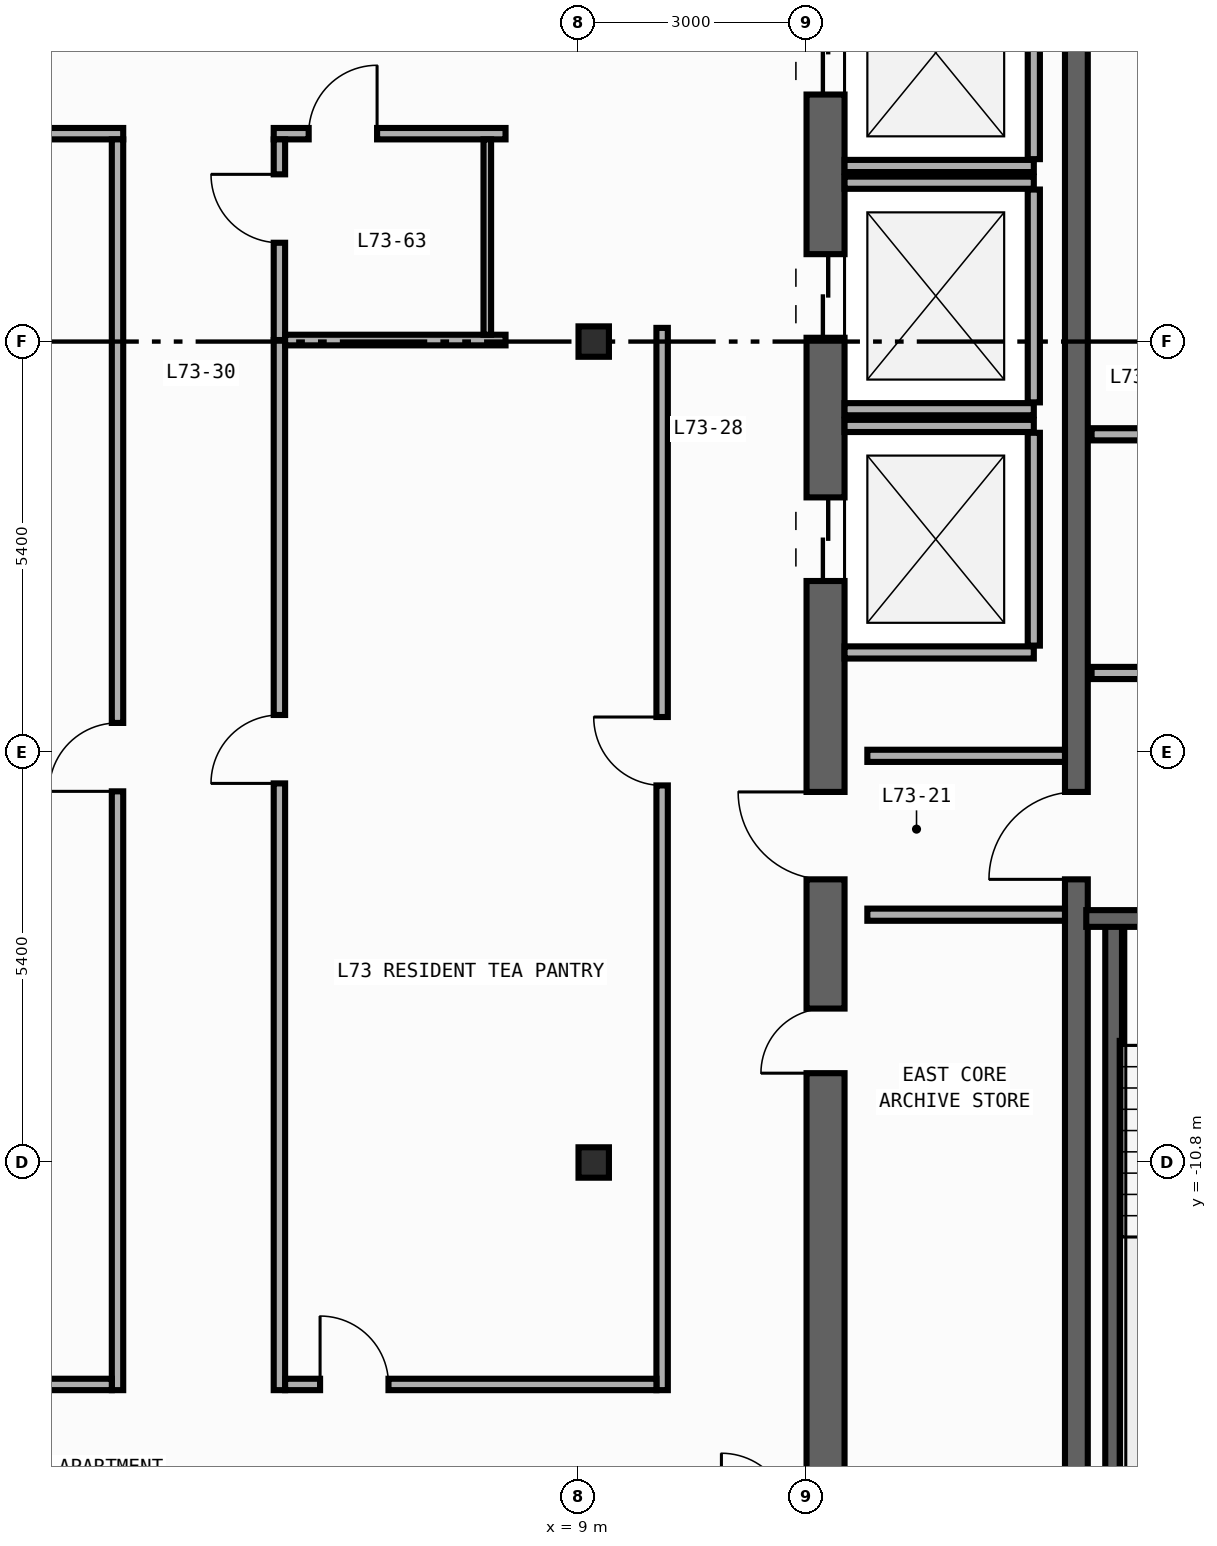
"""IFC4 building model, lengths in metres.
Left out: names, types, materials, properties, quantities, classifications, styles, units other than length and angle.
Written with IfcOpenShell. Run it as: python <this file> out.ifc"""

import sys

from ifc_helpers import new_model, si_unit, direction, frame, frame_2d, origin, origin_2d, place, context, subcontext, project, spatial, rectangle, i_section, extrude, element, fill, save


model = new_model("IFC4")
c1 = context("Model", 3, precision=1e-05, world=origin(), true_north=direction((0.0, 1.0)))
c2 = subcontext(c1, "Body", "Model", "MODEL_VIEW")
j1 = project(units=[si_unit("LENGTHUNIT", "METRE"), si_unit("PLANEANGLEUNIT", "RADIAN")], contexts=[c1])
p1 = place(None, origin())
s1 = spatial("IfcSite", under=j1, at=p1, CompositionType="ELEMENT")
p2 = place(p1, origin())
s2 = spatial("IfcBuilding", under=s1, at=p2, CompositionType="ELEMENT")
p3 = place(p2, frame((0.0, 0.0, 304.2)))
s3 = spatial("IfcBuildingStorey", under=s2, at=p3, CompositionType="ELEMENT", Elevation=304.2)
p4 = place(p3, frame((12.25, -19.8, 0.0), z_axis=(0.0, 0.0, 1.0), x_axis=(0.0, 1.0, 0.0)))
e1 = element("IfcWall", 1, at=p4, inside=s3, PredefinedType="SHEAR", context=c2, shape_type="SweptSolid", body=[
    extrude(rectangle(XDim=27.0, YDim=0.5, at=frame_2d((13.5, 0.0))), origin(), (0.0, 0.0, 1.0), 3.54),
])
p5 = place(p4, frame((23.05, 0.0, 0.0)))
e2 = element("IfcOpeningElement", 2, at=p5, cuts=e1, PredefinedType="OPENING", context=c2, shape_type="SweptSolid", body=[
    extrude(rectangle(XDim=1.1, YDim=2.2, at=frame_2d((0.55, 1.1))), frame((0.0, 0.26, 0.0), z_axis=(0.0, -1.0, 0.0), x_axis=(1.0, 0.0, 0.0)), (0.0, 0.0, 1.0), 0.52),
])
p6 = place(p4, frame((19.85, 0.0, 0.0)))
e3 = element("IfcOpeningElement", 3, at=p6, cuts=e1, PredefinedType="OPENING", context=c2, shape_type="SweptSolid", body=[
    extrude(rectangle(XDim=1.1, YDim=2.2, at=frame_2d((0.55, 1.1))), frame((0.0, 0.26, 0.0), z_axis=(0.0, -1.0, 0.0), x_axis=(1.0, 0.0, 0.0)), (0.0, 0.0, 1.0), 0.52),
])
p7 = place(p4, frame((16.65, 0.0, 0.0)))
e4 = element("IfcOpeningElement", 4, at=p7, cuts=e1, PredefinedType="OPENING", context=c2, shape_type="SweptSolid", body=[
    extrude(rectangle(XDim=1.1, YDim=2.2, at=frame_2d((0.55, 1.1))), frame((0.0, 0.26, 0.0), z_axis=(0.0, -1.0, 0.0), x_axis=(1.0, 0.0, 0.0)), (0.0, 0.0, 1.0), 0.52),
])
p8 = place(p4, frame((10.175, 0.0, 0.0)))
e5 = element("IfcOpeningElement", 5, at=p8, cuts=e1, PredefinedType="OPENING", context=c2, shape_type="SweptSolid", body=[
    extrude(rectangle(XDim=0.85, YDim=2.1, at=frame_2d((0.425, 1.05))), frame((0.0, 0.26, 0.0), z_axis=(0.0, -1.0, 0.0), x_axis=(1.0, 0.0, 0.0)), (0.0, 0.0, 1.0), 0.52),
])
p9 = place(p4, frame((12.725, 0.0, 0.0)))
e6 = element("IfcOpeningElement", 6, at=p9, cuts=e1, PredefinedType="OPENING", context=c2, shape_type="SweptSolid", body=[
    extrude(rectangle(XDim=1.15, YDim=2.2, at=frame_2d((0.575, 1.1))), frame((0.0, 0.26, 0.0), z_axis=(0.0, -1.0, 0.0), x_axis=(1.0, 0.0, 0.0)), (0.0, 0.0, 1.0), 0.52),
])
p10 = place(p4, frame((25.125, 0.0, 0.0)))
e7 = element("IfcOpeningElement", 7, at=p10, cuts=e1, PredefinedType="OPENING", context=c2, shape_type="SweptSolid", body=[
    extrude(rectangle(XDim=0.85, YDim=2.1, at=frame_2d((0.425, 1.05))), frame((0.0, 0.26, 0.0), z_axis=(0.0, -1.0, 0.0), x_axis=(1.0, 0.0, 0.0)), (0.0, 0.0, 1.0), 0.52),
])
p11 = place(p3, frame((15.55, -19.3, 0.0), z_axis=(0.0, 0.0, 1.0), x_axis=(0.0, 1.0, 0.0)))
e8 = element("IfcWall", 8, at=p11, inside=s3, PredefinedType="SHEAR", context=c2, shape_type="SweptSolid", body=[
    extrude(rectangle(XDim=26.0, YDim=0.3, at=frame_2d((13.0, 0.0))), origin(), (0.0, 0.0, 1.0), 3.54),
])
p12 = place(p11, frame((12.225, 0.0, 0.0)))
e9 = element("IfcOpeningElement", 9, at=p12, cuts=e8, PredefinedType="OPENING", context=c2, shape_type="SweptSolid", body=[
    extrude(rectangle(XDim=1.15, YDim=2.2, at=frame_2d((0.575, 1.1))), frame((0.0, 0.16, 0.0), z_axis=(0.0, -1.0, 0.0), x_axis=(1.0, 0.0, 0.0)), (0.0, 0.0, 1.0), 0.32),
])
p13 = place(p11, frame((24.625, 0.0, 0.0)))
e10 = element("IfcOpeningElement", 10, at=p13, cuts=e8, PredefinedType="OPENING", context=c2, shape_type="SweptSolid", body=[
    extrude(rectangle(XDim=0.85, YDim=2.1, at=frame_2d((0.425, 1.05))), frame((0.0, 0.16, 0.0), z_axis=(0.0, -1.0, 0.0), x_axis=(1.0, 0.0, 0.0)), (0.0, 0.0, 1.0), 0.32),
])
p14 = place(p3, frame((16.04, -19.01, 0.0), z_axis=(0.0, 0.0, 1.0), x_axis=(0.0, 1.0, 0.0)))
e11 = element("IfcWall", 11, at=p14, inside=s3, PredefinedType="SHEAR", context=c2, shape_type="SweptSolid", body=[
    extrude(rectangle(XDim=11.42, YDim=0.22, at=frame_2d((5.71, 0.0))), origin(), (0.0, 0.0, 1.0), 3.54),
])
p15 = place(p3, frame((19.92, -7.59, 0.0), z_axis=(0.0, 0.0, 1.0), x_axis=(-1.0, 0.0, 0.0)))
e12 = element("IfcWall", 12, at=p15, inside=s3, PredefinedType="SHEAR", context=c2, shape_type="SweptSolid", body=[
    extrude(rectangle(XDim=4.24, YDim=0.22, at=frame_2d((2.12, 0.0))), origin(), (0.0, 0.0, 1.0), 3.54),
])
p16 = place(p15, frame((1.08, 0.0, 0.0)))
e13 = element("IfcOpeningElement", 13, at=p16, cuts=e12, PredefinedType="OPENING", context=c2, shape_type="SweptSolid", body=[
    extrude(rectangle(XDim=1.1, YDim=2.2, at=frame_2d((0.55, 1.1))), frame((0.0, 0.12, 0.0), z_axis=(0.0, -1.0, 0.0), x_axis=(1.0, 0.0, 0.0)), (0.0, 0.0, 1.0), 0.24),
])
for number, where, z_axis, x_axis in (
    (14, (9.2, -10.8, 0.0), (0.0, 0.0, 1.0), (1.0, 0.0, 0.0)),
    (15, (9.2, 0.0, 0.0), (0.0, 0.0, 1.0), (1.0, 0.0, 0.0)),
):
    element("IfcColumn", number, at=place(p3, frame(where, z_axis=z_axis, x_axis=x_axis)), inside=s3, PredefinedType="COLUMN", context=c2, shape_type="SweptSolid", body=[
        extrude(i_section(OverallWidth=0.4, OverallDepth=0.4, WebThickness=0.013, FlangeThickness=0.021, FilletRadius=0.022, at=origin_2d()), origin(), (0.0, 0.0, 1.0), 3.8),
    ])
p17 = place(p3, frame((12.5, 2.31, 0.0), z_axis=(0.0, 0.0, 1.0), x_axis=(1.0, 0.0, 0.0)))
e16 = element("IfcWall", 16, at=p17, inside=s3, PredefinedType="STANDARD", context=c2, shape_type="SweptSolid", body=[
    extrude(rectangle(XDim=2.49, YDim=0.16, at=frame_2d((1.245, 0.0))), origin(), (0.0, 0.0, 1.0), 3.54),
])
p18 = place(p3, frame((14.99, 2.4, 0.0), z_axis=(0.0, 0.0, 1.0), x_axis=(0.0, 1.0, 0.0)))
e17 = element("IfcWall", 17, at=p18, inside=s3, PredefinedType="STANDARD", context=c2, shape_type="SweptSolid", body=[
    extrude(rectangle(XDim=2.8, YDim=0.16, at=frame_2d((1.4, 0.0))), origin(), (0.0, 0.0, 1.0), 3.54),
])
for number, where, z_axis, x_axis in (
    (18, (12.5, -0.89, 0.0), (0.0, 0.0, 1.0), (1.0, 0.0, 0.0)),
    (19, (12.5, 2.09, 0.0), (0.0, 0.0, 1.0), (1.0, 0.0, 0.0)),
):
    element("IfcWall", number, at=place(p3, frame(where, z_axis=z_axis, x_axis=x_axis)), inside=s3, PredefinedType="STANDARD", context=c2, shape_type="SweptSolid", body=[
        extrude(rectangle(XDim=2.49, YDim=0.16, at=frame_2d((1.245, 0.0))), origin(), (0.0, 0.0, 1.0), 3.54),
    ])
p19 = place(p3, frame((14.99, -0.8, 0.0), z_axis=(0.0, 0.0, 1.0), x_axis=(0.0, 1.0, 0.0)))
e20 = element("IfcWall", 20, at=p19, inside=s3, PredefinedType="STANDARD", context=c2, shape_type="SweptSolid", body=[
    extrude(rectangle(XDim=2.8, YDim=0.16, at=frame_2d((1.4, 0.0))), origin(), (0.0, 0.0, 1.0), 3.54),
])
for number, where, z_axis, x_axis in (
    (21, (12.5, -4.09, 0.0), (0.0, 0.0, 1.0), (1.0, 0.0, 0.0)),
    (22, (12.5, -1.11, 0.0), (0.0, 0.0, 1.0), (1.0, 0.0, 0.0)),
):
    element("IfcWall", number, at=place(p3, frame(where, z_axis=z_axis, x_axis=x_axis)), inside=s3, PredefinedType="STANDARD", context=c2, shape_type="SweptSolid", body=[
        extrude(rectangle(XDim=2.49, YDim=0.16, at=frame_2d((1.245, 0.0))), origin(), (0.0, 0.0, 1.0), 3.54),
    ])
p20 = place(p3, frame((14.99, -4.0, 0.0), z_axis=(0.0, 0.0, 1.0), x_axis=(0.0, 1.0, 0.0)))
e23 = element("IfcWall", 23, at=p20, inside=s3, PredefinedType="STANDARD", context=c2, shape_type="SweptSolid", body=[
    extrude(rectangle(XDim=2.8, YDim=0.16, at=frame_2d((1.4, 0.0))), origin(), (0.0, 0.0, 1.0), 3.54),
])
p21 = place(p3, frame((15.75, -4.36, 0.0), z_axis=(0.0, 0.0, 1.0), x_axis=(1.0, 0.0, 0.0)))
e24 = element("IfcWall", 24, at=p21, inside=s3, PredefinedType="STANDARD", context=c2, shape_type="SweptSolid", body=[
    extrude(rectangle(XDim=3.8, YDim=0.16, at=frame_2d((1.9, 0.0))), origin(), (0.0, 0.0, 1.0), 3.54),
])
p22 = place(p21, frame((1.47, 0.0, 0.0)))
e25 = element("IfcOpeningElement", 25, at=p22, cuts=e24, PredefinedType="OPENING", context=c2, shape_type="SweptSolid", body=[
    extrude(rectangle(XDim=1.15, YDim=2.2, at=frame_2d((0.575, 1.1))), frame((0.0, 0.09, 0.0), z_axis=(0.0, -1.0, 0.0), x_axis=(1.0, 0.0, 0.0)), (0.0, 0.0, 1.0), 0.18),
])
p23 = place(p3, frame((15.75, -1.22, 0.0), z_axis=(0.0, 0.0, 1.0), x_axis=(1.0, 0.0, 0.0)))
e26 = element("IfcWall", 26, at=p23, inside=s3, PredefinedType="STANDARD", context=c2, shape_type="SweptSolid", body=[
    extrude(rectangle(XDim=3.8, YDim=0.16, at=frame_2d((1.9, 0.0))), origin(), (0.0, 0.0, 1.0), 3.54),
])
for number, where, z_axis, x_axis in (
    (27, (12.8, -5.45, 0.0), (0.0, 0.0, 1.0), (1.0, 0.0, 0.0)),
    (28, (12.8, -7.54, 0.0), (0.0, 0.0, 1.0), (1.0, 0.0, 0.0)),
):
    element("IfcWall", number, at=place(p3, frame(where, z_axis=z_axis, x_axis=x_axis)), inside=s3, PredefinedType="STANDARD", context=c2, shape_type="SweptSolid", body=[
        extrude(rectangle(XDim=2.6, YDim=0.16, at=frame_2d((1.3, 0.0))), origin(), (0.0, 0.0, 1.0), 3.54),
    ])
p24 = place(p3, frame((10.1, -13.795, 0.0), z_axis=(0.0, 0.0, 1.0), x_axis=(0.0, 1.0, 0.0)))
e29 = element("IfcWall", 29, at=p24, inside=s3, PredefinedType="PARTITIONING", context=c2, shape_type="SweptSolid", body=[
    extrude(rectangle(XDim=13.975, YDim=0.15, at=frame_2d((6.987, 0.0))), origin(), (0.0, 0.0, 1.0), 3.54),
])
p25 = place(p24, frame((7.956, 0.0, 0.0)))
e30 = element("IfcOpeningElement", 30, at=p25, cuts=e29, PredefinedType="OPENING", context=c2, shape_type="SweptSolid", body=[
    extrude(rectangle(XDim=0.9, YDim=2.15, at=frame_2d((0.45, 1.075))), frame((0.0, 0.085, 0.0), z_axis=(0.0, -1.0, 0.0), x_axis=(1.0, 0.0, 0.0)), (0.0, 0.0, 1.0), 0.17),
])
p26 = place(p3, frame((-10.025, 2.735, 0.0), z_axis=(0.0, 0.0, 1.0), x_axis=(1.0, 0.0, 0.0)))
e31 = element("IfcWall", 31, at=p26, inside=s3, PredefinedType="PARTITIONING", context=c2, shape_type="SweptSolid", body=[
    extrude(rectangle(XDim=13.035, YDim=0.15, at=frame_2d((6.518, 0.0))), origin(), (0.0, 0.0, 1.0), 3.54),
])
p27 = place(p26, frame((9.672, 0.0, 0.0)))
e32 = element("IfcOpeningElement", 32, at=p27, cuts=e31, PredefinedType="OPENING", context=c2, shape_type="SweptSolid", body=[
    extrude(rectangle(XDim=0.9, YDim=2.15, at=frame_2d((0.45, 1.075))), frame((0.0, 0.085, 0.0), z_axis=(0.0, -1.0, 0.0), x_axis=(1.0, 0.0, 0.0)), (0.0, 0.0, 1.0), 0.17),
])
p28 = place(p3, frame((4.99, 2.735, 0.0), z_axis=(0.0, 0.0, 1.0), x_axis=(1.0, 0.0, 0.0)))
e33 = element("IfcWall", 33, at=p28, inside=s3, PredefinedType="PARTITIONING", context=c2, shape_type="SweptSolid", body=[
    extrude(rectangle(XDim=3.05, YDim=0.15, at=frame_2d((1.525, 0.0))), origin(), (0.0, 0.0, 1.0), 3.54),
])
p29 = place(p28, frame((0.46, 0.0, 0.0)))
e34 = element("IfcOpeningElement", 34, at=p29, cuts=e33, PredefinedType="OPENING", context=c2, shape_type="SweptSolid", body=[
    extrude(rectangle(XDim=0.9, YDim=2.15, at=frame_2d((0.45, 1.075))), frame((0.0, 0.085, 0.0), z_axis=(0.0, -1.0, 0.0), x_axis=(1.0, 0.0, 0.0)), (0.0, 0.0, 1.0), 0.17),
])
p30 = place(p3, frame((2.935, -13.795, 0.0), z_axis=(0.0, 0.0, 1.0), x_axis=(0.0, 1.0, 0.0)))
e35 = element("IfcWall", 35, at=p30, inside=s3, PredefinedType="PARTITIONING", context=c2, shape_type="SweptSolid", body=[
    extrude(rectangle(XDim=16.455, YDim=0.15, at=frame_2d((8.228, 0.0))), origin(), (0.0, 0.0, 1.0), 3.54),
])
p31 = place(p30, frame((7.878, 0.0, 0.0)))
e36 = element("IfcOpeningElement", 36, at=p31, cuts=e35, PredefinedType="OPENING", context=c2, shape_type="SweptSolid", body=[
    extrude(rectangle(XDim=0.9, YDim=2.15, at=frame_2d((0.45, 1.075))), frame((0.0, 0.085, 0.0), z_axis=(0.0, -1.0, 0.0), x_axis=(1.0, 0.0, 0.0)), (0.0, 0.0, 1.0), 0.17),
])
p32 = place(p3, frame((5.065, 0.02, 0.0), z_axis=(0.0, 0.0, 1.0), x_axis=(0.0, 1.0, 0.0)))
e37 = element("IfcWall", 37, at=p32, inside=s3, PredefinedType="PARTITIONING", context=c2, shape_type="SweptSolid", body=[
    extrude(rectangle(XDim=2.64, YDim=0.15, at=frame_2d((1.32, 0.0))), origin(), (0.0, 0.0, 1.0), 3.19),
])
p33 = place(p32, frame((1.28, 0.0, 0.0)))
e38 = element("IfcOpeningElement", 38, at=p33, cuts=e37, PredefinedType="OPENING", context=c2, shape_type="SweptSolid", body=[
    extrude(rectangle(XDim=0.9, YDim=2.15, at=frame_2d((0.45, 1.075))), frame((0.0, 0.085, 0.0), z_axis=(0.0, -1.0, 0.0), x_axis=(1.0, 0.0, 0.0)), (0.0, 0.0, 1.0), 0.17),
])
p34 = place(p3, frame((5.065, -13.795, 0.0), z_axis=(0.0, 0.0, 1.0), x_axis=(0.0, 1.0, 0.0)))
e39 = element("IfcWall", 39, at=p34, inside=s3, PredefinedType="PARTITIONING", context=c2, shape_type="SweptSolid", body=[
    extrude(rectangle(XDim=13.815, YDim=0.15, at=frame_2d((6.907, 0.0))), origin(), (0.0, 0.0, 1.0), 3.19),
])
p35 = place(p34, frame((7.982, 0.0, 0.0)))
e40 = element("IfcOpeningElement", 40, at=p35, cuts=e39, PredefinedType="OPENING", context=c2, shape_type="SweptSolid", body=[
    extrude(rectangle(XDim=0.9, YDim=2.15, at=frame_2d((0.45, 1.075))), frame((0.0, 0.085, 0.0), z_axis=(0.0, -1.0, 0.0), x_axis=(1.0, 0.0, 0.0)), (0.0, 0.0, 1.0), 0.17),
])
p36 = place(p3, frame((-10.025, -13.72, 0.0), z_axis=(0.0, 0.0, 1.0), x_axis=(1.0, 0.0, 0.0)))
e41 = element("IfcWall", 41, at=p36, inside=s3, PredefinedType="PARTITIONING", context=c2, shape_type="SweptSolid", body=[
    extrude(rectangle(XDim=12.885, YDim=0.15, at=frame_2d((6.442, 0.0))), origin(), (0.0, 0.0, 1.0), 3.54),
])
p37 = place(p36, frame((7.3, 0.0, 0.0)))
e42 = element("IfcOpeningElement", 42, at=p37, cuts=e41, PredefinedType="OPENING", context=c2, shape_type="SweptSolid", body=[
    extrude(rectangle(XDim=0.9, YDim=2.15, at=frame_2d((0.45, 1.075))), frame((0.0, 0.085, 0.0), z_axis=(0.0, -1.0, 0.0), x_axis=(1.0, 0.0, 0.0)), (0.0, 0.0, 1.0), 0.17),
])
p38 = place(p3, frame((5.14, -13.72, 0.0), z_axis=(0.0, 0.0, 1.0), x_axis=(1.0, 0.0, 0.0)))
e43 = element("IfcWall", 43, at=p38, inside=s3, PredefinedType="PARTITIONING", context=c2, shape_type="SweptSolid", body=[
    extrude(rectangle(XDim=4.885, YDim=0.15, at=frame_2d((2.442, 0.0))), origin(), (0.0, 0.0, 1.0), 3.54),
])
p39 = place(p38, frame((0.46, 0.0, 0.0)))
e44 = element("IfcOpeningElement", 44, at=p39, cuts=e43, PredefinedType="OPENING", context=c2, shape_type="SweptSolid", body=[
    extrude(rectangle(XDim=0.9, YDim=2.15, at=frame_2d((0.45, 1.075))), frame((0.0, 0.085, 0.0), z_axis=(0.0, -1.0, 0.0), x_axis=(1.0, 0.0, 0.0)), (0.0, 0.0, 1.0), 0.17),
])
p40 = place(p3, frame((5.14, 0.02, 0.0), z_axis=(0.0, 0.0, 1.0), x_axis=(1.0, 0.0, 0.0)))
e45 = element("IfcWall", 45, at=p40, inside=s3, PredefinedType="PARTITIONING", context=c2, shape_type="SweptSolid", body=[
    extrude(rectangle(XDim=2.9, YDim=0.14, at=frame_2d((1.45, 0.0))), origin(), (0.0, 0.0, 1.0), 2.64),
])
p41 = place(p3, frame((7.8, 2.66, 0.0), z_axis=(0.0, 0.0, 1.0), x_axis=(0.0, -1.0, 0.0)))
e46 = element("IfcWall", 46, at=p41, inside=s3, PredefinedType="PARTITIONING", context=c2, shape_type="SweptSolid", body=[
    extrude(rectangle(XDim=2.57, YDim=0.1, at=frame_2d((1.285, 0.0))), origin(), (0.0, 0.0, 1.0), 3.54),
])
p42 = place(p5, origin())
e47 = element("IfcDoor", 47, at=p42, inside=s3, OperationType="DOUBLE_DOOR_SLIDING", PredefinedType="DOOR", context=c2, shape_type="SweptSolid", body=[
    extrude(rectangle(XDim=1.1, YDim=2.2, at=frame_2d((0.55, 1.1))), frame((0.0, 0.025, 0.0), z_axis=(0.0, -1.0, 0.0), x_axis=(1.0, 0.0, 0.0)), (0.0, 0.0, 1.0), 0.05),
])
fill(e2, e47)
p43 = place(p6, origin())
e48 = element("IfcDoor", 48, at=p43, inside=s3, OperationType="DOUBLE_DOOR_SLIDING", PredefinedType="DOOR", context=c2, shape_type="SweptSolid", body=[
    extrude(rectangle(XDim=1.1, YDim=2.2, at=frame_2d((0.55, 1.1))), frame((0.0, 0.025, 0.0), z_axis=(0.0, -1.0, 0.0), x_axis=(1.0, 0.0, 0.0)), (0.0, 0.0, 1.0), 0.05),
])
fill(e3, e48)
p44 = place(p7, origin())
e49 = element("IfcDoor", 49, at=p44, inside=s3, OperationType="DOUBLE_DOOR_SLIDING", PredefinedType="DOOR", context=c2, shape_type="SweptSolid", body=[
    extrude(rectangle(XDim=1.1, YDim=2.2, at=frame_2d((0.55, 1.1))), frame((0.0, 0.025, 0.0), z_axis=(0.0, -1.0, 0.0), x_axis=(1.0, 0.0, 0.0)), (0.0, 0.0, 1.0), 0.05),
])
fill(e4, e49)
p45 = place(p8, origin())
e50 = element("IfcDoor", 50, at=p45, inside=s3, OperationType="SINGLE_SWING_LEFT", PredefinedType="DOOR", context=c2, shape_type="SweptSolid", body=[
    extrude(rectangle(XDim=0.85, YDim=2.1, at=frame_2d((0.425, 1.05))), frame((0.0, 0.025, 0.0), z_axis=(0.0, -1.0, 0.0), x_axis=(1.0, 0.0, 0.0)), (0.0, 0.0, 1.0), 0.05),
])
fill(e5, e50)
p46 = place(p9, origin())
e51 = element("IfcDoor", 51, at=p46, inside=s3, OperationType="SINGLE_SWING_RIGHT", PredefinedType="DOOR", context=c2, shape_type="SweptSolid", body=[
    extrude(rectangle(XDim=1.15, YDim=2.2, at=frame_2d((0.575, 1.1))), frame((0.0, 0.025, 0.0), z_axis=(0.0, -1.0, 0.0), x_axis=(1.0, 0.0, 0.0)), (0.0, 0.0, 1.0), 0.05),
])
fill(e6, e51)
p47 = place(p12, origin())
e52 = element("IfcDoor", 52, at=p47, inside=s3, OperationType="SINGLE_SWING_LEFT", PredefinedType="DOOR", context=c2, shape_type="SweptSolid", body=[
    extrude(rectangle(XDim=1.15, YDim=2.2, at=frame_2d((0.575, 1.1))), frame((0.0, 0.025, 0.0), z_axis=(0.0, -1.0, 0.0), x_axis=(1.0, 0.0, 0.0)), (0.0, 0.0, 1.0), 0.05),
])
fill(e9, e52)
p48 = place(p25, origin())
e53 = element("IfcDoor", 53, at=p48, inside=s3, OperationType="SINGLE_SWING_RIGHT", PredefinedType="DOOR", context=c2, shape_type="SweptSolid", body=[
    extrude(rectangle(XDim=0.9, YDim=2.15, at=frame_2d((0.45, 1.075))), frame((0.0, 0.025, 0.0), z_axis=(0.0, -1.0, 0.0), x_axis=(1.0, 0.0, 0.0)), (0.0, 0.0, 1.0), 0.05),
])
fill(e30, e53)
p49 = place(p29, origin())
e54 = element("IfcDoor", 54, at=p49, inside=s3, OperationType="SINGLE_SWING_RIGHT", PredefinedType="DOOR", context=c2, shape_type="SweptSolid", body=[
    extrude(rectangle(XDim=0.9, YDim=2.15, at=frame_2d((0.45, 1.075))), frame((0.0, 0.025, 0.0), z_axis=(0.0, -1.0, 0.0), x_axis=(1.0, 0.0, 0.0)), (0.0, 0.0, 1.0), 0.05),
])
fill(e34, e54)
p50 = place(p31, origin())
e55 = element("IfcDoor", 55, at=p50, inside=s3, OperationType="SINGLE_SWING_LEFT", PredefinedType="DOOR", context=c2, shape_type="SweptSolid", body=[
    extrude(rectangle(XDim=0.9, YDim=2.15, at=frame_2d((0.45, 1.075))), frame((0.0, 0.025, 0.0), z_axis=(0.0, -1.0, 0.0), x_axis=(1.0, 0.0, 0.0)), (0.0, 0.0, 1.0), 0.05),
])
fill(e36, e55)
p51 = place(p33, origin())
e56 = element("IfcDoor", 56, at=p51, inside=s3, OperationType="SINGLE_SWING_RIGHT", PredefinedType="DOOR", context=c2, shape_type="SweptSolid", body=[
    extrude(rectangle(XDim=0.9, YDim=2.15, at=frame_2d((0.45, 1.075))), frame((0.0, 0.025, 0.0), z_axis=(0.0, -1.0, 0.0), x_axis=(1.0, 0.0, 0.0)), (0.0, 0.0, 1.0), 0.05),
])
fill(e38, e56)
p52 = place(p35, origin())
e57 = element("IfcDoor", 57, at=p52, inside=s3, OperationType="SINGLE_SWING_LEFT", PredefinedType="DOOR", context=c2, shape_type="SweptSolid", body=[
    extrude(rectangle(XDim=0.9, YDim=2.15, at=frame_2d((0.45, 1.075))), frame((0.0, 0.025, 0.0), z_axis=(0.0, -1.0, 0.0), x_axis=(1.0, 0.0, 0.0)), (0.0, 0.0, 1.0), 0.05),
])
fill(e40, e57)
p53 = place(p39, origin())
e58 = element("IfcDoor", 58, at=p53, inside=s3, OperationType="SINGLE_SWING_LEFT", PredefinedType="DOOR", context=c2, shape_type="SweptSolid", body=[
    extrude(rectangle(XDim=0.9, YDim=2.15, at=frame_2d((0.45, 1.075))), frame((0.0, 0.025, 0.0), z_axis=(0.0, -1.0, 0.0), x_axis=(1.0, 0.0, 0.0)), (0.0, 0.0, 1.0), 0.05),
])
fill(e44, e58)
save(model, sys.argv[1])
